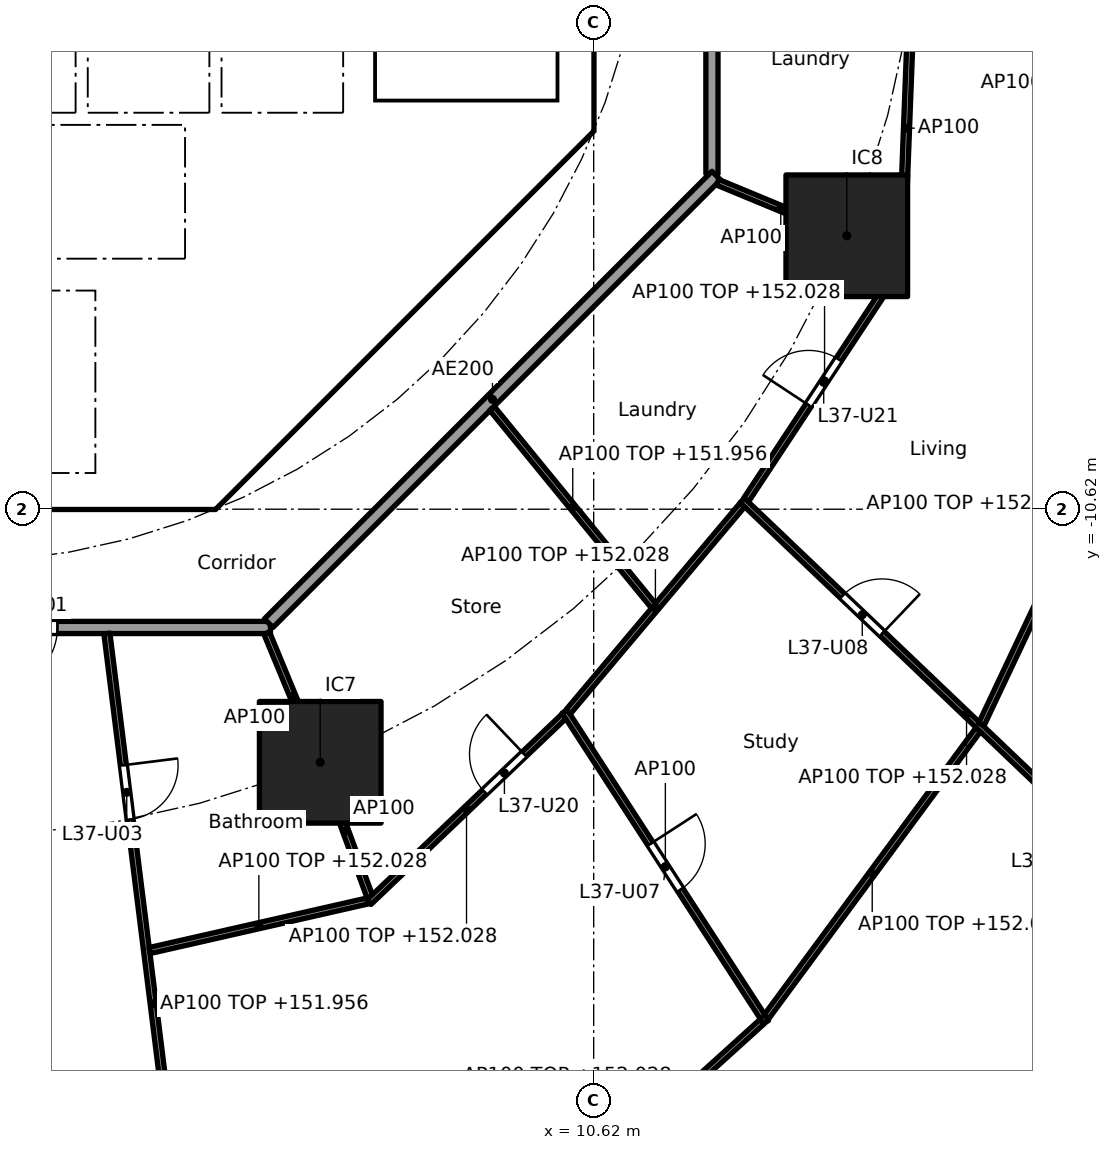
"""IFC4 building model, lengths in metres.
Left out: names, types, materials, properties, quantities, classifications, styles, units other than length and angle.
Written with IfcOpenShell. Run it as: python <this file> out.ifc"""

import sys

from ifc_helpers import new_model, si_unit, direction, frame, frame_2d, origin, origin_2d, place, context, subcontext, project, spatial, polyline, rectangle, outline, extrude, element, fill, save


model = new_model("IFC4")
c1 = context("Model", 3, precision=1e-05, world=origin(), true_north=direction((0.0, 1.0)))
c2 = subcontext(c1, "Body", "Model", "MODEL_VIEW")
j1 = project(units=[si_unit("LENGTHUNIT", "METRE"), si_unit("PLANEANGLEUNIT", "RADIAN")], contexts=[c1])
p1 = place(None, origin())
s1 = spatial("IfcSite", under=j1, at=p1, CompositionType="ELEMENT")
p2 = place(p1, origin())
s2 = spatial("IfcBuilding", under=s1, at=p2, CompositionType="ELEMENT")
p3 = place(p2, frame((0.0, 0.0, 149.2)))
s3 = spatial("IfcBuildingStorey", under=s2, at=p3, CompositionType="ELEMENT", Elevation=149.2)
for number, where, z_axis, x_axis in (
    (1, (6.123, -14.782, 0.0), (0.0, 0.0, 1.0), (1.0, 0.0, 0.0)),
    (2, (14.782, -6.123, 0.0), (0.0, 0.0, 1.0), (1.0, 0.0, 0.0)),
):
    element("IfcColumn", number, at=place(p3, frame(where, z_axis=z_axis, x_axis=x_axis)), inside=s3, PredefinedType="COLUMN", context=c2, shape_type="SweptSolid", body=[
        extrude(rectangle(XDim=2.0, YDim=2.0, at=origin_2d()), origin(), (0.0, 0.0, 1.0), 3.7),
    ])
p4 = place(p3, frame((4.613, -9.988, 0.0), z_axis=(0.0, 0.0, 1.0), x_axis=(0.707106781187, 0.707106781187, 0.0)))
e3 = element("IfcWall", 3, at=p4, inside=s3, PredefinedType="SHEAR", context=c2, shape_type="SweptSolid", body=[
    extrude(rectangle(XDim=7.602, YDim=0.6, at=frame_2d((3.801, 0.0))), origin(), (0.0, 0.0, 1.0), 3.44),
])
p5 = place(p4, frame((3.201, 0.0, 0.0)))
e4 = element("IfcOpeningElement", 4, at=p5, cuts=e3, PredefinedType="OPENING", context=c2, shape_type="SweptSolid", body=[
    extrude(rectangle(XDim=1.2, YDim=2.1, at=frame_2d((0.6, 1.05))), frame((0.0, 0.31, 0.0), z_axis=(0.0, -1.0, 0.0), x_axis=(1.0, 0.0, 0.0)), (0.0, 0.0, 1.0), 0.62),
])
p6 = place(p3, frame((4.0, -10.025, 0.0), z_axis=(0.0, 0.0, 1.0), x_axis=(0.0, 1.0, 0.0)))
e5 = element("IfcWall", 5, at=p6, inside=s3, PredefinedType="SOLIDWALL", context=c2, shape_type="SweptSolid", body=[
    extrude(rectangle(XDim=3.0, YDim=0.2, at=frame_2d((1.5, 0.0))), origin(), (0.0, 0.0, 1.0), 3.44),
])
p7 = place(p6, frame((0.975, 0.0, 0.0)))
e6 = element("IfcOpeningElement", 6, at=p7, cuts=e5, PredefinedType="OPENING", context=c2, shape_type="SweptSolid", body=[
    extrude(rectangle(XDim=1.1, YDim=2.1, at=frame_2d((0.55, 1.05))), frame((0.0, 0.11, 0.0), z_axis=(0.0, -1.0, 0.0), x_axis=(1.0, 0.0, 0.0)), (0.0, 0.0, 1.0), 0.22),
])
p8 = place(p3, frame((4.0, -6.5, 0.0), z_axis=(0.0, 0.0, 1.0), x_axis=(0.0, 1.0, 0.0)))
e7 = element("IfcWall", 7, at=p8, inside=s3, PredefinedType="SOLIDWALL", context=c2, shape_type="SweptSolid", body=[
    extrude(rectangle(XDim=2.2, YDim=0.2, at=frame_2d((1.1, 0.0))), origin(), (0.0, 0.0, 1.0), 3.44),
])
p9 = place(p8, frame((0.55, 0.0, 0.0)))
e8 = element("IfcOpeningElement", 8, at=p9, cuts=e7, PredefinedType="OPENING", context=c2, shape_type="SweptSolid", body=[
    extrude(rectangle(XDim=1.1, YDim=2.1, at=frame_2d((0.55, 1.05))), frame((0.0, 0.11, 0.0), z_axis=(0.0, -1.0, 0.0), x_axis=(1.0, 0.0, 0.0)), (0.0, 0.0, 1.0), 0.22),
])
p10 = place(p3, origin())
e9 = element("IfcWall", 9, at=p10, inside=s3, PredefinedType="SHEAR", context=c2, shape_type="SweptSolid", body=[
    extrude(outline(polyline([(-4.152, -10.025), (4.152, -10.025), (4.401, -9.776), (4.825, -10.2), (4.401, -10.625), (-4.401, -10.625), (-4.825, -10.2), (-4.401, -9.776), (-4.152, -10.025)])), origin(), (0.0, 0.0, 1.0), 3.44),
])
p11 = place(p3, origin())
e10 = element("IfcWall", 10, at=p11, inside=s3, PredefinedType="SHEAR", context=c2, shape_type="SweptSolid", body=[
    extrude(outline(polyline([(9.776, -4.401), (10.025, -4.152), (10.025, -3.801), (10.025, 4.152), (9.776, 4.401), (10.2, 4.825), (10.625, 4.401), (10.625, -4.401), (10.2, -4.825), (9.776, -4.401)])), origin(), (0.0, 0.0, 1.0), 3.44),
])
p12 = place(p3, origin())
e11 = element("IfcWall", 11, at=p12, inside=s3, PredefinedType="SOLIDWALL", context=c2, shape_type="SweptSolid", body=[
    extrude(outline(polyline([(-6.7, -2.1), (-6.5, -2.1), (-6.5, -4.1), (-4.5, -4.1), (-4.5, -2.1), (-4.3, -2.1), (-4.3, -4.1), (-2.3, -4.1), (-2.3, -2.1), (-2.1, -2.1), (-2.1, -4.1), (-0.1, -4.1), (-0.1, -2.1), (0.1, -2.1), (0.1, -4.1), (2.1, -4.1), (2.1, -2.1), (2.3, -2.1), (2.3, -4.1), (4.3, -4.1), (4.3, -2.1), (4.5, -2.1), (4.5, -4.1), (6.5, -4.1), (6.5, -2.1), (6.7, -2.1), (6.7, -4.3), (-6.7, -4.3), (-6.7, -2.1)])), origin(), (0.0, 0.0, 1.0), 3.44),
])
p13 = place(p3, origin())
e12 = element("IfcWall", 12, at=p13, inside=s3, PredefinedType="SOLIDWALL", context=c2, shape_type="SweptSolid", body=[
    extrude(outline(polyline([(4.1, -7.025), (-4.1, -7.025), (-4.1, -6.5), (4.1, -6.5), (4.1, -7.025)])), origin(), (0.0, 0.0, 1.0), 3.44),
])
p14 = place(p3, origin())
e13 = element("IfcWall", 13, at=p14, inside=s3, PredefinedType="SOLIDWALL", context=c2, shape_type="SweptSolid", body=[
    extrude(outline(polyline([(7.025, -3.9), (6.7, -3.9), (6.7, 3.9), (7.025, 3.9), (7.025, -3.9)])), origin(), (0.0, 0.0, 1.0), 3.44),
])
p15 = place(p3, origin())
e14 = element("IfcWall", 14, at=p15, inside=s3, PredefinedType="SOLIDWALL", context=c2, shape_type="SweptSolid", body=[
    extrude(outline(polyline([(10.025, -4.1), (6.7, -4.1), (6.7, -3.9), (10.025, -3.9), (10.025, -4.1)])), origin(), (0.0, 0.0, 1.0), 3.44),
])
p16 = place(p3, frame((12.565, -5.104, 0.0), z_axis=(0.0, 0.0, 1.0), x_axis=(0.0, 1.0, 0.0)))
e15 = element("IfcWall", 15, at=p16, inside=s3, PredefinedType="PARTITIONING", context=c2, shape_type="SweptSolid", body=[
    extrude(rectangle(XDim=10.209, YDim=0.2, at=frame_2d((5.104, 0.0))), origin(), (0.0, 0.0, 1.0), 3.44),
])
p17 = place(p3, frame((-5.104, -12.565, 0.0), z_axis=(0.0, 0.0, 1.0), x_axis=(1.0, 0.0, 0.0)))
e16 = element("IfcWall", 16, at=p17, inside=s3, PredefinedType="PARTITIONING", context=c2, shape_type="SweptSolid", body=[
    extrude(rectangle(XDim=10.409, YDim=0.2, at=frame_2d((5.205, 0.0))), origin(), (0.0, 0.0, 1.0), 3.44),
])
p18 = place(p17, frame((5.906, 0.0, 0.0)))
e17 = element("IfcOpeningElement", 17, at=p18, cuts=e16, PredefinedType="OPENING", context=c2, shape_type="SweptSolid", body=[
    extrude(rectangle(XDim=1.0, YDim=2.1, at=frame_2d((0.5, 1.05))), frame((0.0, 0.11, 0.0), z_axis=(0.0, -1.0, 0.0), x_axis=(1.0, 0.0, 0.0)), (0.0, 0.0, 1.0), 0.22),
])
p19 = place(p3, frame((5.275, -12.494, 0.0), z_axis=(0.0, 0.0, 1.0), x_axis=(0.707106781187, 0.707106781187, 0.0)))
e18 = element("IfcWall", 18, at=p19, inside=s3, PredefinedType="PARTITIONING", context=c2, shape_type="SweptSolid", body=[
    extrude(rectangle(XDim=10.409, YDim=0.2, at=frame_2d((5.205, 0.0))), origin(), (0.0, 0.0, 1.0), 3.44),
])
p20 = place(p3, frame((15.849, -2.158, 0.0), z_axis=(0.0, 0.0, 1.0), x_axis=(-0.038390448414, -0.999262815014, 0.0)))
e19 = element("IfcWall", 19, at=p20, inside=s3, PredefinedType="PARTITIONING", context=c2, shape_type="SweptSolid", body=[
    extrude(rectangle(XDim=4.394, YDim=0.1, at=frame_2d((2.197, 0.0))), origin(), (0.0, 0.0, 1.0), 3.44),
])
p21 = place(p3, frame((2.615, -12.664, 0.0), z_axis=(0.0, 0.0, 1.0), x_axis=(0.124051875784, -0.992275733914, 0.0)))
e20 = element("IfcWall", 20, at=p21, inside=s3, PredefinedType="PARTITIONING", context=c2, shape_type="SweptSolid", body=[
    extrude(rectangle(XDim=12.271, YDim=0.1, at=frame_2d((6.135, 0.0))), origin(), (0.0, 0.0, 1.0), 2.756),
])
p22 = place(p21, frame((2.183, 0.0, 0.0)))
e21 = element("IfcOpeningElement", 21, at=p22, cuts=e20, PredefinedType="OPENING", context=c2, shape_type="SweptSolid", body=[
    extrude(rectangle(XDim=0.9, YDim=2.1, at=frame_2d((0.45, 1.05))), frame((0.0, 0.06, 0.0), z_axis=(0.0, -1.0, 0.0), x_axis=(1.0, 0.0, 0.0)), (0.0, 0.0, 1.0), 0.12),
])
p23 = place(p21, frame((8.293, 0.0, 0.0)))
e22 = element("IfcOpeningElement", 22, at=p23, cuts=e20, PredefinedType="OPENING", context=c2, shape_type="SweptSolid", body=[
    extrude(rectangle(XDim=0.9, YDim=2.1, at=frame_2d((0.45, 1.05))), frame((0.0, 0.06, 0.0), z_axis=(0.0, -1.0, 0.0), x_axis=(1.0, 0.0, 0.0)), (0.0, 0.0, 1.0), 0.12),
])
p24 = place(p3, frame((3.317, -17.878, 0.0), z_axis=(0.0, 0.0, 1.0), x_axis=(0.975099660451, 0.221767112505, 0.0)))
e23 = element("IfcWall", 23, at=p24, inside=s3, PredefinedType="PARTITIONING", context=c2, shape_type="SweptSolid", body=[
    extrude(rectangle(XDim=3.686, YDim=0.1, at=frame_2d((1.843, 0.0))), origin(), (0.0, 0.0, 1.0), 2.828),
])
p25 = place(p3, frame((5.243, -12.657, 0.0), z_axis=(0.0, 0.0, 1.0), x_axis=(0.382703272338, -0.923871314276, 0.0)))
e24 = element("IfcWall", 24, at=p25, inside=s3, PredefinedType="PARTITIONING", context=c2, shape_type="SweptSolid", body=[
    extrude(rectangle(XDim=2.249, YDim=0.1, at=frame_2d((1.125, 0.0))), origin(), (0.0, 0.0, 1.0), 3.44),
])
p26 = place(p3, frame((6.14, -14.829, 0.0), z_axis=(0.0, 0.0, 1.0), x_axis=(0.346198576881, -0.938161257655, 0.0)))
e25 = element("IfcWall", 25, at=p26, inside=s3, PredefinedType="PARTITIONING", context=c2, shape_type="SweptSolid", body=[
    extrude(rectangle(XDim=2.317, YDim=0.1, at=frame_2d((1.158, 0.0))), origin(), (0.0, 0.0, 1.0), 3.44),
])
p27 = place(p3, frame((6.923, -17.084, 0.0), z_axis=(0.0, 0.0, 1.0), x_axis=(0.723719008606, 0.690094773623, 0.0)))
e26 = element("IfcWall", 26, at=p27, inside=s3, PredefinedType="PARTITIONING", context=c2, shape_type="SweptSolid", body=[
    extrude(rectangle(XDim=4.436, YDim=0.1, at=frame_2d((2.218, 0.0))), origin(), (0.0, 0.0, 1.0), 2.828),
])
p28 = place(p27, frame((2.629, 0.0, 0.0)))
e27 = element("IfcOpeningElement", 27, at=p28, cuts=e26, PredefinedType="OPENING", context=c2, shape_type="SweptSolid", body=[
    extrude(rectangle(XDim=0.9, YDim=2.1, at=frame_2d((0.45, 1.05))), frame((0.0, 0.06, 0.0), z_axis=(0.0, -1.0, 0.0), x_axis=(1.0, 0.0, 0.0)), (0.0, 0.0, 1.0), 0.12),
])
p29 = place(p3, frame((9.084, -22.941, 0.0), z_axis=(0.0, 0.0, 1.0), x_axis=(0.741684187175, 0.670749257543, 0.0)))
e28 = element("IfcWall", 28, at=p29, inside=s3, PredefinedType="PARTITIONING", context=c2, shape_type="SweptSolid", body=[
    extrude(rectangle(XDim=5.806, YDim=0.1, at=frame_2d((2.903, 0.0))), origin(), (0.0, 0.0, 1.0), 2.828),
])
p30 = place(p3, frame((10.143, -13.946, 0.0), z_axis=(0.0, 0.0, 1.0), x_axis=(0.543872968754, -0.839167560061, 0.0)))
e29 = element("IfcWall", 29, at=p30, inside=s3, PredefinedType="PARTITIONING", context=c2, shape_type="SweptSolid", body=[
    extrude(rectangle(XDim=6.088, YDim=0.1, at=frame_2d((3.044, 0.0))), origin(), (0.0, 0.0, 1.0), 3.44),
])
p31 = place(p30, frame((2.594, 0.0, 0.0)))
e30 = element("IfcOpeningElement", 30, at=p31, cuts=e29, PredefinedType="OPENING", context=c2, shape_type="SweptSolid", body=[
    extrude(rectangle(XDim=0.9, YDim=2.1, at=frame_2d((0.45, 1.05))), frame((0.0, 0.06, 0.0), z_axis=(0.0, -1.0, 0.0), x_axis=(1.0, 0.0, 0.0)), (0.0, 0.0, 1.0), 0.12),
])
p32 = place(p3, frame((10.202, -13.95, 0.0), z_axis=(0.0, 0.0, 1.0), x_axis=(0.644068144287, 0.764968120587, 0.0)))
e31 = element("IfcWall", 31, at=p32, inside=s3, PredefinedType="PARTITIONING", context=c2, shape_type="SweptSolid", body=[
    extrude(rectangle(XDim=4.449, YDim=0.1, at=frame_2d((2.224, 0.0))), origin(), (0.0, 0.0, 1.0), 2.828),
])
p33 = place(p3, frame((13.457, -18.973, 0.0), z_axis=(0.0, 0.0, 1.0), x_axis=(0.593532053206, 0.80481035146, 0.0)))
e32 = element("IfcWall", 32, at=p33, inside=s3, PredefinedType="PARTITIONING", context=c2, shape_type="SweptSolid", body=[
    extrude(rectangle(XDim=5.876, YDim=0.1, at=frame_2d((2.938, 0.0))), origin(), (0.0, 0.0, 1.0), 2.828),
])
p34 = place(p3, frame((8.948, -8.962, 0.0), z_axis=(0.0, 0.0, 1.0), x_axis=(0.633041272858, -0.774118044524, 0.0)))
e33 = element("IfcWall", 33, at=p34, inside=s3, PredefinedType="PARTITIONING", context=c2, shape_type="SweptSolid", body=[
    extrude(rectangle(XDim=4.195, YDim=0.1, at=frame_2d((2.097, 0.0))), origin(), (0.0, 0.0, 1.0), 2.756),
])
p35 = place(p3, frame((13.064, -10.474, 0.0), z_axis=(0.0, 0.0, 1.0), x_axis=(0.723627371706, -0.690190862673, 0.0)))
e34 = element("IfcWall", 34, at=p35, inside=s3, PredefinedType="PARTITIONING", context=c2, shape_type="SweptSolid", body=[
    extrude(rectangle(XDim=10.193, YDim=0.1, at=frame_2d((5.097, 0.0))), origin(), (0.0, 0.0, 1.0), 2.828),
])
p36 = place(p35, frame((2.277, 0.0, 0.0)))
e35 = element("IfcOpeningElement", 35, at=p36, cuts=e34, PredefinedType="OPENING", context=c2, shape_type="SweptSolid", body=[
    extrude(rectangle(XDim=0.9, YDim=2.1, at=frame_2d((0.45, 1.05))), frame((0.0, 0.06, 0.0), z_axis=(0.0, -1.0, 0.0), x_axis=(1.0, 0.0, 0.0)), (0.0, 0.0, 1.0), 0.12),
])
p37 = place(p35, frame((7.348, 0.0, 0.0)))
e36 = element("IfcOpeningElement", 36, at=p37, cuts=e34, PredefinedType="OPENING", context=c2, shape_type="SweptSolid", body=[
    extrude(rectangle(XDim=0.9, YDim=2.1, at=frame_2d((0.45, 1.05))), frame((0.0, 0.06, 0.0), z_axis=(0.0, -1.0, 0.0), x_axis=(1.0, 0.0, 0.0)), (0.0, 0.0, 1.0), 0.12),
])
p38 = place(p3, frame((13.127, -10.467, 0.0), z_axis=(0.0, 0.0, 1.0), x_axis=(0.550614843759, 0.834759422727, 0.0)))
e37 = element("IfcWall", 37, at=p38, inside=s3, PredefinedType="PARTITIONING", context=c2, shape_type="SweptSolid", body=[
    extrude(rectangle(XDim=4.683, YDim=0.1, at=frame_2d((2.341, 0.0))), origin(), (0.0, 0.0, 1.0), 2.828),
])
p39 = place(p38, frame((1.866, 0.0, 0.0)))
e38 = element("IfcOpeningElement", 38, at=p39, cuts=e37, PredefinedType="OPENING", context=c2, shape_type="SweptSolid", body=[
    extrude(rectangle(XDim=0.9, YDim=2.1, at=frame_2d((0.45, 1.05))), frame((0.0, 0.06, 0.0), z_axis=(0.0, -1.0, 0.0), x_axis=(1.0, 0.0, 0.0)), (0.0, 0.0, 1.0), 0.12),
])
p40 = place(p3, frame((16.995, -14.158, 0.0), z_axis=(0.0, 0.0, 1.0), x_axis=(0.427456178439, 0.904036069808, 0.0)))
e39 = element("IfcWall", 39, at=p40, inside=s3, PredefinedType="PARTITIONING", context=c2, shape_type="SweptSolid", body=[
    extrude(rectangle(XDim=6.113, YDim=0.1, at=frame_2d((3.057, 0.0))), origin(), (0.0, 0.0, 1.0), 2.828),
])
p41 = place(p3, frame((12.657, -5.243, 0.0), z_axis=(0.0, 0.0, 1.0), x_axis=(0.923864733477, -0.382719158442, 0.0)))
e40 = element("IfcWall", 40, at=p41, inside=s3, PredefinedType="PARTITIONING", context=c2, shape_type="SweptSolid", body=[
    extrude(rectangle(XDim=2.25, YDim=0.1, at=frame_2d((1.125, 0.0))), origin(), (0.0, 0.0, 1.0), 3.44),
])
p42 = place(p9, origin())
e41 = element("IfcDoor", 41, at=p42, inside=s3, OperationType="DOUBLE_DOOR_SLIDING", PredefinedType="DOOR", context=c2, shape_type="SweptSolid", body=[
    extrude(rectangle(XDim=1.1, YDim=2.1, at=frame_2d((0.55, 1.05))), frame((0.0, 0.025, 0.0), z_axis=(0.0, -1.0, 0.0), x_axis=(1.0, 0.0, 0.0)), (0.0, 0.0, 1.0), 0.05),
])
fill(e8, e41)
p43 = place(p7, origin())
e42 = element("IfcDoor", 42, at=p43, inside=s3, OperationType="SINGLE_SWING_LEFT", PredefinedType="DOOR", context=c2, shape_type="SweptSolid", body=[
    extrude(rectangle(XDim=1.1, YDim=2.1, at=frame_2d((0.55, 1.05))), frame((0.0, 0.025, 0.0), z_axis=(0.0, -1.0, 0.0), x_axis=(1.0, 0.0, 0.0)), (0.0, 0.0, 1.0), 0.05),
])
fill(e6, e42)
p44 = place(p5, origin())
e43 = element("IfcDoor", 43, at=p44, inside=s3, OperationType="SINGLE_SWING_LEFT", PredefinedType="DOOR", context=c2, shape_type="SweptSolid", body=[
    extrude(rectangle(XDim=1.2, YDim=2.1, at=frame_2d((0.6, 1.05))), frame((0.0, 0.025, 0.0), z_axis=(0.0, -1.0, 0.0), x_axis=(1.0, 0.0, 0.0)), (0.0, 0.0, 1.0), 0.05),
])
fill(e4, e43)
p45 = place(p18, frame((1.0, 0.0, 0.0), x_axis=(-1.0, 0.0, 0.0)))
e44 = element("IfcDoor", 44, at=p45, inside=s3, OperationType="SINGLE_SWING_RIGHT", PredefinedType="DOOR", context=c2, shape_type="SweptSolid", body=[
    extrude(rectangle(XDim=1.0, YDim=2.1, at=frame_2d((0.5, 1.05))), frame((0.0, 0.025, 0.0), z_axis=(0.0, -1.0, 0.0), x_axis=(1.0, 0.0, 0.0)), (0.0, 0.0, 1.0), 0.05),
])
fill(e17, e44)
p46 = place(p22, origin())
e45 = element("IfcDoor", 45, at=p46, inside=s3, OperationType="SINGLE_SWING_LEFT", PredefinedType="DOOR", context=c2, shape_type="SweptSolid", body=[
    extrude(rectangle(XDim=0.9, YDim=2.1, at=frame_2d((0.45, 1.05))), frame((0.0, 0.025, 0.0), z_axis=(0.0, -1.0, 0.0), x_axis=(1.0, 0.0, 0.0)), (0.0, 0.0, 1.0), 0.05),
])
fill(e21, e45)
p47 = place(p31, origin())
e46 = element("IfcDoor", 46, at=p47, inside=s3, OperationType="SINGLE_SWING_LEFT", PredefinedType="DOOR", context=c2, shape_type="SweptSolid", body=[
    extrude(rectangle(XDim=0.9, YDim=2.1, at=frame_2d((0.45, 1.05))), frame((0.0, 0.025, 0.0), z_axis=(0.0, -1.0, 0.0), x_axis=(1.0, 0.0, 0.0)), (0.0, 0.0, 1.0), 0.05),
])
fill(e30, e46)
p48 = place(p36, origin())
e47 = element("IfcDoor", 47, at=p48, inside=s3, OperationType="SINGLE_SWING_RIGHT", PredefinedType="DOOR", context=c2, shape_type="SweptSolid", body=[
    extrude(rectangle(XDim=0.9, YDim=2.1, at=frame_2d((0.45, 1.05))), frame((0.0, 0.025, 0.0), z_axis=(0.0, -1.0, 0.0), x_axis=(1.0, 0.0, 0.0)), (0.0, 0.0, 1.0), 0.05),
])
fill(e35, e47)
p49 = place(p28, origin())
e48 = element("IfcDoor", 48, at=p49, inside=s3, OperationType="SINGLE_SWING_RIGHT", PredefinedType="DOOR", context=c2, shape_type="SweptSolid", body=[
    extrude(rectangle(XDim=0.9, YDim=2.1, at=frame_2d((0.45, 1.05))), frame((0.0, 0.025, 0.0), z_axis=(0.0, -1.0, 0.0), x_axis=(1.0, 0.0, 0.0)), (0.0, 0.0, 1.0), 0.05),
])
fill(e27, e48)
p50 = place(p39, origin())
e49 = element("IfcDoor", 49, at=p50, inside=s3, OperationType="SINGLE_SWING_LEFT", PredefinedType="DOOR", context=c2, shape_type="SweptSolid", body=[
    extrude(rectangle(XDim=0.9, YDim=2.1, at=frame_2d((0.45, 1.05))), frame((0.0, 0.025, 0.0), z_axis=(0.0, -1.0, 0.0), x_axis=(1.0, 0.0, 0.0)), (0.0, 0.0, 1.0), 0.05),
])
fill(e38, e49)
save(model, sys.argv[1])
